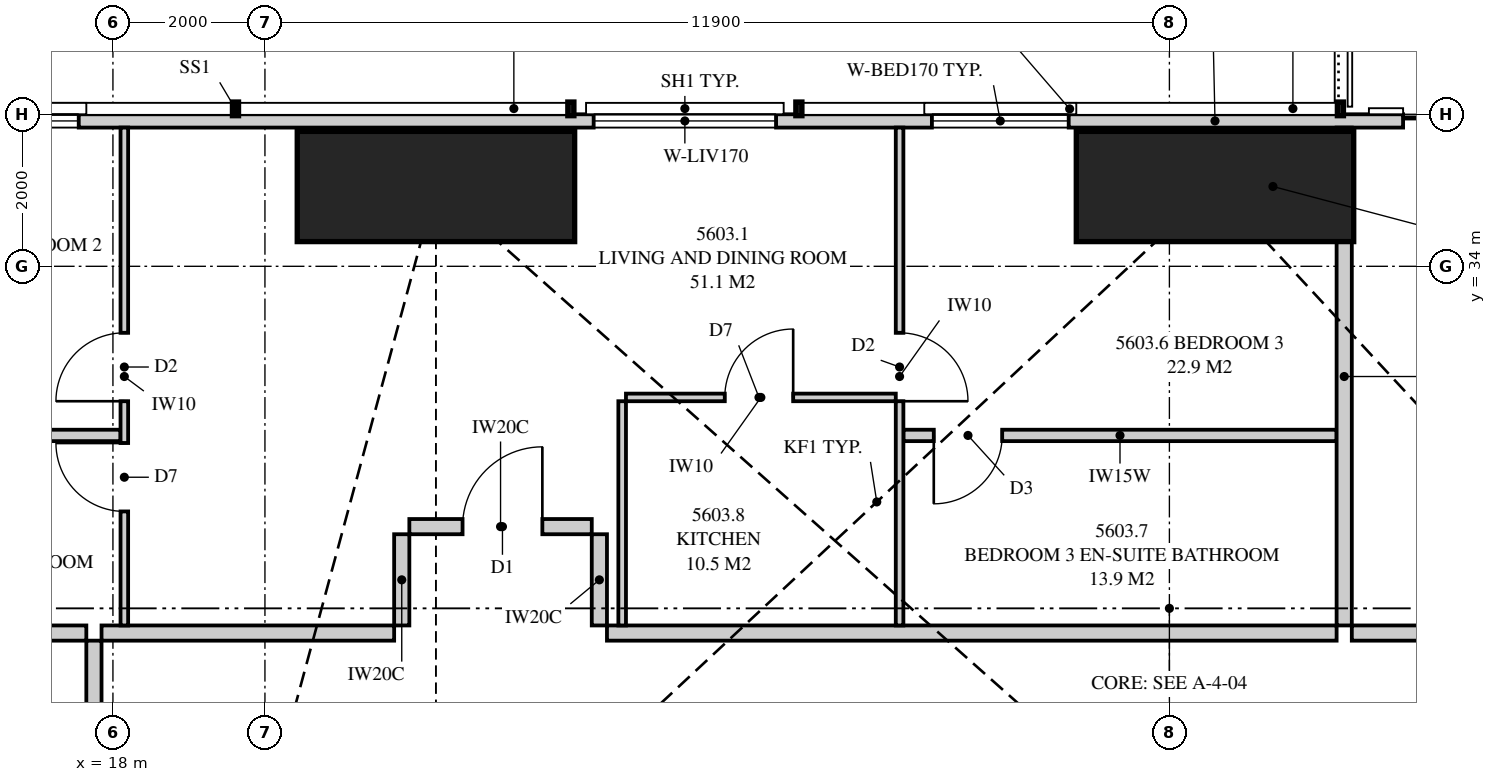
"""IFC4 building model, lengths in metres.
Left out: names, types, materials, properties, quantities, classifications, styles, units other than length and angle.
Written with IfcOpenShell. Run it as: python <this file> out.ifc"""

import sys

from ifc_helpers import new_model, si_unit, direction, frame, frame_2d, origin, origin_2d, place, context, subcontext, project, spatial, polyline, rectangle, outline, extrude, element, fill, save


model = new_model("IFC4")
c1 = context("Model", 3, precision=1e-05, world=origin(), true_north=direction((0.0, 1.0)))
c2 = subcontext(c1, "Body", "Model", "MODEL_VIEW")
j1 = project(units=[si_unit("LENGTHUNIT", "METRE"), si_unit("PLANEANGLEUNIT", "RADIAN")], contexts=[c1])
p1 = place(None, origin())
s1 = spatial("IfcSite", under=j1, at=p1, CompositionType="ELEMENT")
p2 = place(p1, origin())
s2 = spatial("IfcBuilding", under=s1, at=p2, CompositionType="ELEMENT")
p3 = place(p2, frame((0.0, 0.0, 204.6)))
s3 = spatial("IfcBuildingStorey", under=s2, at=p3, CompositionType="ELEMENT", Elevation=204.6)
for number, where, z_axis, x_axis in (
    (1, (32.5, 35.05, 0.0), (0.0, 0.0, 1.0), (0.0, 1.0, 0.0)),
    (2, (22.25, 35.05, 0.0), (0.0, 0.0, 1.0), (0.0, 1.0, 0.0)),
):
    element("IfcColumn", number, at=place(p3, frame(where, z_axis=z_axis, x_axis=x_axis)), inside=s3, PredefinedType="COLUMN", context=c2, shape_type="SweptSolid", body=[
        extrude(rectangle(XDim=1.45, YDim=3.65, at=origin_2d()), origin(), (0.0, 0.0, 1.0), 3.35),
    ])
p4 = place(p3, frame((49.949, 35.913, 0.0), z_axis=(0.0, 0.0, 1.0), x_axis=(-1.0, 0.0, 0.0)))
e3 = element("IfcWall", 3, at=p4, inside=s3, PredefinedType="SOLIDWALL", context=c2, shape_type="SweptSolid", body=[
    extrude(rectangle(XDim=34.897, YDim=0.175, at=frame_2d((17.449, 0.0))), origin(), (0.0, 0.0, 1.0), 3.07),
])
p5 = place(p4, frame((13.174, 0.0, 0.0)))
e4 = element("IfcOpeningElement", 4, at=p5, cuts=e3, PredefinedType="OPENING", context=c2, shape_type="SweptSolid", body=[
    extrude(rectangle(XDim=1.8, YDim=2.1, at=frame_2d((0.9, 1.05))), frame((0.0, 0.097, 0.0), z_axis=(0.0, -1.0, 0.0), x_axis=(1.0, 0.0, 0.0)), (0.0, 0.0, 1.0), 0.195),
])
p6 = place(p4, frame((19.374, 0.0, 0.4)))
e5 = element("IfcOpeningElement", 5, at=p6, cuts=e3, PredefinedType="OPENING", context=c2, shape_type="SweptSolid", body=[
    extrude(rectangle(XDim=1.8, YDim=1.7, at=frame_2d((0.9, 0.85))), frame((0.0, 0.097, 0.0), z_axis=(0.0, -1.0, 0.0), x_axis=(1.0, 0.0, 0.0)), (0.0, 0.0, 1.0), 0.195),
])
p7 = place(p4, frame((23.224, 0.0, 0.4)))
e6 = element("IfcOpeningElement", 6, at=p7, cuts=e3, PredefinedType="OPENING", context=c2, shape_type="SweptSolid", body=[
    extrude(rectangle(XDim=2.4, YDim=1.7, at=frame_2d((1.2, 0.85))), frame((0.0, 0.097, 0.0), z_axis=(0.0, -1.0, 0.0), x_axis=(1.0, 0.0, 0.0)), (0.0, 0.0, 1.0), 0.195),
])
p8 = place(p4, frame((32.399, 0.0, 0.4)))
e7 = element("IfcOpeningElement", 7, at=p8, cuts=e3, PredefinedType="OPENING", context=c2, shape_type="SweptSolid", body=[
    extrude(rectangle(XDim=1.8, YDim=1.7, at=frame_2d((0.9, 0.85))), frame((0.0, 0.097, 0.0), z_axis=(0.0, -1.0, 0.0), x_axis=(1.0, 0.0, 0.0)), (0.0, 0.0, 1.0), 0.195),
])
p9 = place(p3, frame((34.2, 35.825, 0.0), z_axis=(0.0, 0.0, 1.0), x_axis=(0.0, -1.0, 0.0)))
e8 = element("IfcWall", 8, at=p9, inside=s3, PredefinedType="PARTITIONING", context=c2, shape_type="SweptSolid", body=[
    extrude(outline(polyline([(0.0, 0.0), (6.55, 0.0), (6.55, 3.07), (3.062, 3.07), (3.062, 2.491), (2.152, 2.491), (2.152, 3.07), (1.275, 3.07), (1.275, 2.07), (0.275, 2.07), (0.275, 3.07), (0.0, 3.07), (0.0, 0.0)])), frame((0.0, 0.1, 0.0), z_axis=(0.0, -1.0, 0.0), x_axis=(1.0, 0.0, 0.0)), (0.0, 0.0, 1.0), 0.2),
])
p10 = place(p3, frame((17.85, 29.175, 0.0), z_axis=(0.0, 0.0, 1.0), x_axis=(1.0, 0.0, 0.0)))
e9 = element("IfcWall", 9, at=p10, inside=s3, PredefinedType="PARTITIONING", context=c2, shape_type="SweptSolid", body=[
    extrude(outline(polyline([(0.0, 0.0), (3.85, 0.0), (3.85, 2.47), (3.69, 2.47), (3.69, 3.07), (3.079, 3.07), (3.079, 2.491), (2.535, 2.491), (2.535, 3.07), (0.0, 3.07), (0.0, 0.0)])), frame((0.0, 0.1, 0.0), z_axis=(0.0, -1.0, 0.0), x_axis=(1.0, 0.0, 0.0)), (0.0, 0.0, 1.0), 0.2),
])
p11 = place(p3, frame((18.15, 35.825, 0.0), z_axis=(0.0, 0.0, 1.0), x_axis=(0.0, -1.0, 0.0)))
e10 = element("IfcWall", 10, at=p11, inside=s3, PredefinedType="PARTITIONING", context=c2, shape_type="SweptSolid", body=[
    extrude(outline(polyline([(0.0, 0.0), (6.55, 0.0), (6.55, 3.07), (2.017, 3.07), (2.017, 2.07), (0.984, 2.07), (0.984, 3.07), (0.0, 3.07), (0.0, 0.0)])), frame((0.0, 0.05, 0.0), z_axis=(0.0, -1.0, 0.0), x_axis=(1.0, 0.0, 0.0)), (0.0, 0.0, 1.0), 0.1),
])
p12 = place(p11, frame((2.7, 0.0, 0.0)))
e11 = element("IfcOpeningElement", 11, at=p12, cuts=e10, PredefinedType="OPENING", context=c2, shape_type="SweptSolid", body=[
    extrude(rectangle(XDim=0.9, YDim=2.1, at=frame_2d((0.45, 1.05))), frame((0.0, 0.06, 0.0), z_axis=(0.0, -1.0, 0.0), x_axis=(1.0, 0.0, 0.0)), (0.0, 0.0, 1.0), 0.12),
])
p13 = place(p11, frame((4.15, 0.0, 0.0)))
e12 = element("IfcOpeningElement", 12, at=p13, cuts=e10, PredefinedType="OPENING", context=c2, shape_type="SweptSolid", body=[
    extrude(rectangle(XDim=0.9, YDim=2.1, at=frame_2d((0.45, 1.05))), frame((0.0, 0.06, 0.0), z_axis=(0.0, -1.0, 0.0), x_axis=(1.0, 0.0, 0.0)), (0.0, 0.0, 1.0), 0.12),
])
p14 = place(p3, frame((28.35, 35.825, 0.0), z_axis=(0.0, 0.0, 1.0), x_axis=(0.0, -1.0, 0.0)))
e13 = element("IfcWall", 13, at=p14, inside=s3, PredefinedType="PARTITIONING", context=c2, shape_type="SweptSolid", body=[
    extrude(outline(polyline([(0.0, 0.0), (6.55, 0.0), (6.55, 2.491), (5.83, 2.491), (5.83, 3.07), (5.015, 3.07), (5.015, 2.491), (4.276, 2.491), (4.276, 3.07), (1.275, 3.07), (1.275, 2.07), (0.275, 2.07), (0.275, 3.07), (0.0, 3.07), (0.0, 0.0)])), frame((0.0, 0.05, 0.0), z_axis=(0.0, -1.0, 0.0), x_axis=(1.0, 0.0, 0.0)), (0.0, 0.0, 1.0), 0.1),
])
p15 = place(p14, frame((2.7, 0.0, 0.0)))
e14 = element("IfcOpeningElement", 14, at=p15, cuts=e13, PredefinedType="OPENING", context=c2, shape_type="SweptSolid", body=[
    extrude(rectangle(XDim=0.9, YDim=2.1, at=frame_2d((0.45, 1.05))), frame((0.0, 0.06, 0.0), z_axis=(0.0, -1.0, 0.0), x_axis=(1.0, 0.0, 0.0)), (0.0, 0.0, 1.0), 0.12),
])
p16 = place(p3, frame((15.2, 31.775, 0.0), z_axis=(0.0, 0.0, 1.0), x_axis=(1.0, 0.0, 0.0)))
e15 = element("IfcWall", 15, at=p16, inside=s3, PredefinedType="PLUMBINGWALL", context=c2, shape_type="SweptSolid", body=[
    extrude(rectangle(XDim=2.9, YDim=0.15, at=frame_2d((1.45, 0.0))), origin(), (0.0, 0.0, 1.0), 3.07),
])
p17 = place(p3, frame((28.4, 31.775, 0.0), z_axis=(0.0, 0.0, 1.0), x_axis=(1.0, 0.0, 0.0)))
e16 = element("IfcWall", 16, at=p17, inside=s3, PredefinedType="PLUMBINGWALL", context=c2, shape_type="SweptSolid", body=[
    extrude(outline(polyline([(0.0, 0.0), (5.7, 0.0), (5.7, 3.07), (4.356, 3.07), (4.356, 2.595), (3.844, 2.595), (3.844, 3.07), (1.015, 3.07), (1.015, 2.491), (0.162, 2.491), (0.162, 3.07), (0.0, 3.07), (0.0, 0.0)])), frame((0.0, 0.075, 0.0), z_axis=(0.0, -1.0, 0.0), x_axis=(1.0, 0.0, 0.0)), (0.0, 0.0, 1.0), 0.15),
])
p18 = place(p17, frame((0.4, 0.0, 0.0)))
e17 = element("IfcOpeningElement", 17, at=p18, cuts=e16, PredefinedType="OPENING", context=c2, shape_type="SweptSolid", body=[
    extrude(rectangle(XDim=0.9, YDim=2.1, at=frame_2d((0.45, 1.05))), frame((0.0, 0.085, 0.0), z_axis=(0.0, -1.0, 0.0), x_axis=(1.0, 0.0, 0.0)), (0.0, 0.0, 1.0), 0.17),
])
p19 = place(p3, frame((24.75, 32.275, 0.0), z_axis=(0.0, 0.0, 1.0), x_axis=(1.0, 0.0, 0.0)))
e18 = element("IfcWall", 18, at=p19, inside=s3, PredefinedType="PARTITIONING", context=c2, shape_type="SweptSolid", body=[
    extrude(outline(polyline([(0.0, 0.0), (3.55, 0.0), (3.55, 3.07), (1.038, 3.07), (1.038, 2.491), (0.214, 2.491), (0.214, 3.07), (0.0, 3.07), (0.0, 0.0)])), frame((0.0, 0.05, 0.0), z_axis=(0.0, -1.0, 0.0), x_axis=(1.0, 0.0, 0.0)), (0.0, 0.0, 1.0), 0.1),
])
p20 = place(p19, frame((1.3, 0.0, 0.0)))
e19 = element("IfcOpeningElement", 19, at=p20, cuts=e18, PredefinedType="OPENING", context=c2, shape_type="SweptSolid", body=[
    extrude(rectangle(XDim=0.9, YDim=2.1, at=frame_2d((0.45, 1.05))), frame((0.0, 0.06, 0.0), z_axis=(0.0, -1.0, 0.0), x_axis=(1.0, 0.0, 0.0)), (0.0, 0.0, 1.0), 0.12),
])
p21 = place(p3, frame((24.7, 32.225, 0.0), z_axis=(0.0, 0.0, 1.0), x_axis=(0.0, -1.0, 0.0)))
e20 = element("IfcWall", 20, at=p21, inside=s3, PredefinedType="PARTITIONING", context=c2, shape_type="SweptSolid", body=[
    extrude(rectangle(XDim=2.95, YDim=0.1, at=frame_2d((1.475, 0.0))), origin(), (0.0, 0.0, 1.0), 3.07),
])
p22 = place(p3, frame((34.3, 29.175, 0.0), z_axis=(0.0, 0.0, 1.0), x_axis=(1.0, 0.0, 0.0)))
e21 = element("IfcWall", 21, at=p22, inside=s3, PredefinedType="PARTITIONING", context=c2, shape_type="SweptSolid", body=[
    extrude(outline(polyline([(0.0, 0.0), (3.625, 0.0), (3.625, 2.491), (3.213, 2.491), (3.213, 3.07), (0.0, 3.07), (0.0, 0.0)])), frame((0.0, 0.1, 0.0), z_axis=(0.0, -1.0, 0.0), x_axis=(1.0, 0.0, 0.0)), (0.0, 0.0, 1.0), 0.2),
])
p23 = place(p3, frame((12.0, 29.175, 0.0), z_axis=(0.0, 0.0, 1.0), x_axis=(1.0, 0.0, 0.0)))
e22 = element("IfcWall", 22, at=p23, inside=s3, PredefinedType="PARTITIONING", context=c2, shape_type="SweptSolid", body=[
    extrude(outline(polyline([(0.0, 0.0), (5.65, 0.0), (5.65, 3.07), (2.147, 3.07), (2.147, 2.07), (1.102, 2.07), (1.102, 3.07), (0.0, 3.07), (0.0, 0.0)])), frame((0.0, 0.1, 0.0), z_axis=(0.0, -1.0, 0.0), x_axis=(1.0, 0.0, 0.0)), (0.0, 0.0, 1.0), 0.2),
])
p24 = place(p3, frame((17.75, 23.05, 0.0), z_axis=(0.0, 0.0, 1.0), x_axis=(0.0, 1.0, 0.0)))
e23 = element("IfcWall", 23, at=p24, inside=s3, PredefinedType="PARTITIONING", context=c2, shape_type="SweptSolid", body=[
    extrude(outline(polyline([(0.0, 0.0), (6.025, 0.0), (6.025, 3.07), (2.162, 3.07), (2.162, 2.595), (1.738, 2.595), (1.738, 3.07), (0.0, 3.07), (0.0, 0.0)])), frame((0.0, 0.1, 0.0), z_axis=(0.0, -1.0, 0.0), x_axis=(1.0, 0.0, 0.0)), (0.0, 0.0, 1.0), 0.2),
])
p25 = place(p24, frame((2.512, 0.0, 0.0)))
e24 = element("IfcOpeningElement", 24, at=p25, cuts=e23, PredefinedType="OPENING", context=c2, shape_type="SweptSolid", body=[
    extrude(rectangle(XDim=1.05, YDim=2.2, at=frame_2d((0.525, 1.1))), frame((0.0, 0.11, 0.0), z_axis=(0.0, -1.0, 0.0), x_axis=(1.0, 0.0, 0.0)), (0.0, 0.0, 1.0), 0.22),
])
p26 = place(p3, frame((24.5, 29.175, 0.0), z_axis=(0.0, 0.0, 1.0), x_axis=(1.0, 0.0, 0.0)))
e25 = element("IfcWall", 25, at=p26, inside=s3, PredefinedType="PARTITIONING", context=c2, shape_type="SweptSolid", body=[
    extrude(outline(polyline([(0.0, 0.0), (9.6, 0.0), (9.6, 3.07), (8.257, 3.07), (8.257, 2.595), (7.743, 2.595), (7.743, 3.07), (4.837, 3.07), (4.837, 2.491), (3.9, 2.491), (3.9, 3.07), (2.154, 3.07), (2.154, 2.491), (1.247, 2.491), (1.247, 3.07), (0.0, 3.07), (0.0, 0.0)])), frame((0.0, 0.1, 0.0), z_axis=(0.0, -1.0, 0.0), x_axis=(1.0, 0.0, 0.0)), (0.0, 0.0, 1.0), 0.2),
])
p27 = place(p3, frame((21.9, 30.575, 0.0), z_axis=(0.0, 0.0, 1.0), x_axis=(1.0, 0.0, 0.0)))
e26 = element("IfcWall", 26, at=p27, inside=s3, PredefinedType="PARTITIONING", context=c2, shape_type="SweptSolid", body=[
    extrude(outline(polyline([(0.0, 0.0), (2.4, 0.0), (2.4, 3.07), (1.06, 3.07), (1.06, 2.47), (0.0, 2.47), (0.0, 3.07), (0.0, 0.0)])), frame((0.0, 0.1, 0.0), z_axis=(0.0, -1.0, 0.0), x_axis=(1.0, 0.0, 0.0)), (0.0, 0.0, 1.0), 0.2),
])
p28 = place(p27, frame((0.7, 0.0, 0.0)))
e27 = element("IfcOpeningElement", 27, at=p28, cuts=e26, PredefinedType="OPENING", context=c2, shape_type="SweptSolid", body=[
    extrude(rectangle(XDim=1.05, YDim=2.2, at=frame_2d((0.525, 1.1))), frame((0.0, 0.11, 0.0), z_axis=(0.0, -1.0, 0.0), x_axis=(1.0, 0.0, 0.0)), (0.0, 0.0, 1.0), 0.22),
])
p29 = place(p3, frame((21.8, 29.275, 0.0), z_axis=(0.0, 0.0, 1.0), x_axis=(0.0, 1.0, 0.0)))
e28 = element("IfcWall", 28, at=p29, inside=s3, PredefinedType="PARTITIONING", context=c2, shape_type="SweptSolid", body=[
    extrude(outline(polyline([(0.0, 0.0), (1.2, 0.0), (1.2, 3.07), (1.2, 2.47), (0.0, 2.47), (0.0, 3.07), (0.0, 0.0)])), frame((0.0, 0.1, 0.0), z_axis=(0.0, -1.0, 0.0), x_axis=(1.0, 0.0, 0.0)), (0.0, 0.0, 1.0), 0.2),
])
p30 = place(p3, frame((24.4, 29.275, 0.0), z_axis=(0.0, 0.0, 1.0), x_axis=(0.0, 1.0, 0.0)))
e29 = element("IfcWall", 29, at=p30, inside=s3, PredefinedType="PARTITIONING", context=c2, shape_type="SweptSolid", body=[
    extrude(rectangle(XDim=1.2, YDim=0.2, at=frame_2d((0.6, 0.0))), origin(), (0.0, 0.0, 1.0), 3.07),
])
p31 = place(p5, origin())
e30 = element("IfcDoor", 30, at=p31, inside=s3, OperationType="SLIDING_TO_LEFT", PredefinedType="DOOR", context=c2, shape_type="SweptSolid", body=[
    extrude(rectangle(XDim=1.8, YDim=2.1, at=frame_2d((0.9, 1.05))), frame((0.0, 0.025, 0.0), z_axis=(0.0, -1.0, 0.0), x_axis=(1.0, 0.0, 0.0)), (0.0, 0.0, 1.0), 0.05),
])
fill(e4, e30)
p32 = place(p6, origin())
e31 = element("IfcWindow", 31, at=p32, inside=s3, PartitioningType="SINGLE_PANEL", PredefinedType="WINDOW", context=c2, shape_type="SweptSolid", body=[
    extrude(rectangle(XDim=1.8, YDim=1.7, at=frame_2d((0.9, 0.85))), frame((0.0, 0.03, 0.0), z_axis=(0.0, -1.0, 0.0), x_axis=(1.0, 0.0, 0.0)), (0.0, 0.0, 1.0), 0.06),
])
fill(e5, e31)
p33 = place(p7, origin())
e32 = element("IfcWindow", 32, at=p33, inside=s3, PartitioningType="SINGLE_PANEL", PredefinedType="WINDOW", context=c2, shape_type="SweptSolid", body=[
    extrude(rectangle(XDim=2.4, YDim=1.7, at=frame_2d((1.2, 0.85))), frame((0.0, 0.03, 0.0), z_axis=(0.0, -1.0, 0.0), x_axis=(1.0, 0.0, 0.0)), (0.0, 0.0, 1.0), 0.06),
])
fill(e6, e32)
p34 = place(p8, origin())
e33 = element("IfcWindow", 33, at=p34, inside=s3, PartitioningType="SINGLE_PANEL", PredefinedType="WINDOW", context=c2, shape_type="SweptSolid", body=[
    extrude(rectangle(XDim=1.8, YDim=1.7, at=frame_2d((0.9, 0.85))), frame((0.0, 0.03, 0.0), z_axis=(0.0, -1.0, 0.0), x_axis=(1.0, 0.0, 0.0)), (0.0, 0.0, 1.0), 0.06),
])
fill(e7, e33)
p35 = place(p28, origin())
e34 = element("IfcDoor", 34, at=p35, inside=s3, OperationType="SINGLE_SWING_RIGHT", PredefinedType="DOOR", context=c2, shape_type="SweptSolid", body=[
    extrude(rectangle(XDim=1.05, YDim=2.2, at=frame_2d((0.525, 1.1))), frame((0.0, 0.025, 0.0), z_axis=(0.0, -1.0, 0.0), x_axis=(1.0, 0.0, 0.0)), (0.0, 0.0, 1.0), 0.05),
])
fill(e27, e34)
p36 = place(p12, frame((0.9, 0.0, 0.0), z_axis=(0.0, 0.0, 1.0), x_axis=(-1.0, 0.0, 0.0)))
e35 = element("IfcDoor", 35, at=p36, inside=s3, OperationType="SINGLE_SWING_LEFT", PredefinedType="DOOR", context=c2, shape_type="SweptSolid", body=[
    extrude(rectangle(XDim=0.9, YDim=2.1, at=frame_2d((0.45, 1.05))), frame((0.0, 0.025, 0.0), z_axis=(0.0, -1.0, 0.0), x_axis=(1.0, 0.0, 0.0)), (0.0, 0.0, 1.0), 0.05),
])
fill(e11, e35)
p37 = place(p13, frame((0.9, 0.0, 0.0), z_axis=(0.0, 0.0, 1.0), x_axis=(-1.0, 0.0, 0.0)))
e36 = element("IfcDoor", 36, at=p37, inside=s3, OperationType="SINGLE_SWING_RIGHT", PredefinedType="DOOR", context=c2, shape_type="SweptSolid", body=[
    extrude(rectangle(XDim=0.9, YDim=2.1, at=frame_2d((0.45, 1.05))), frame((0.0, 0.025, 0.0), z_axis=(0.0, -1.0, 0.0), x_axis=(1.0, 0.0, 0.0)), (0.0, 0.0, 1.0), 0.05),
])
fill(e12, e36)
p38 = place(p15, origin())
e37 = element("IfcDoor", 37, at=p38, inside=s3, OperationType="SINGLE_SWING_RIGHT", PredefinedType="DOOR", context=c2, shape_type="SweptSolid", body=[
    extrude(rectangle(XDim=0.9, YDim=2.1, at=frame_2d((0.45, 1.05))), frame((0.0, 0.025, 0.0), z_axis=(0.0, -1.0, 0.0), x_axis=(1.0, 0.0, 0.0)), (0.0, 0.0, 1.0), 0.05),
])
fill(e14, e37)
p39 = place(p18, frame((0.9, 0.0, 0.0), z_axis=(0.0, 0.0, 1.0), x_axis=(-1.0, 0.0, 0.0)))
e38 = element("IfcDoor", 38, at=p39, inside=s3, OperationType="SINGLE_SWING_RIGHT", PredefinedType="DOOR", context=c2, shape_type="SweptSolid", body=[
    extrude(rectangle(XDim=0.9, YDim=2.1, at=frame_2d((0.45, 1.05))), frame((0.0, 0.025, 0.0), z_axis=(0.0, -1.0, 0.0), x_axis=(1.0, 0.0, 0.0)), (0.0, 0.0, 1.0), 0.05),
])
fill(e17, e38)
p40 = place(p20, origin())
e39 = element("IfcDoor", 39, at=p40, inside=s3, OperationType="SINGLE_SWING_RIGHT", PredefinedType="DOOR", context=c2, shape_type="SweptSolid", body=[
    extrude(rectangle(XDim=0.9, YDim=2.1, at=frame_2d((0.45, 1.05))), frame((0.0, 0.025, 0.0), z_axis=(0.0, -1.0, 0.0), x_axis=(1.0, 0.0, 0.0)), (0.0, 0.0, 1.0), 0.05),
])
fill(e19, e39)
save(model, sys.argv[1])
